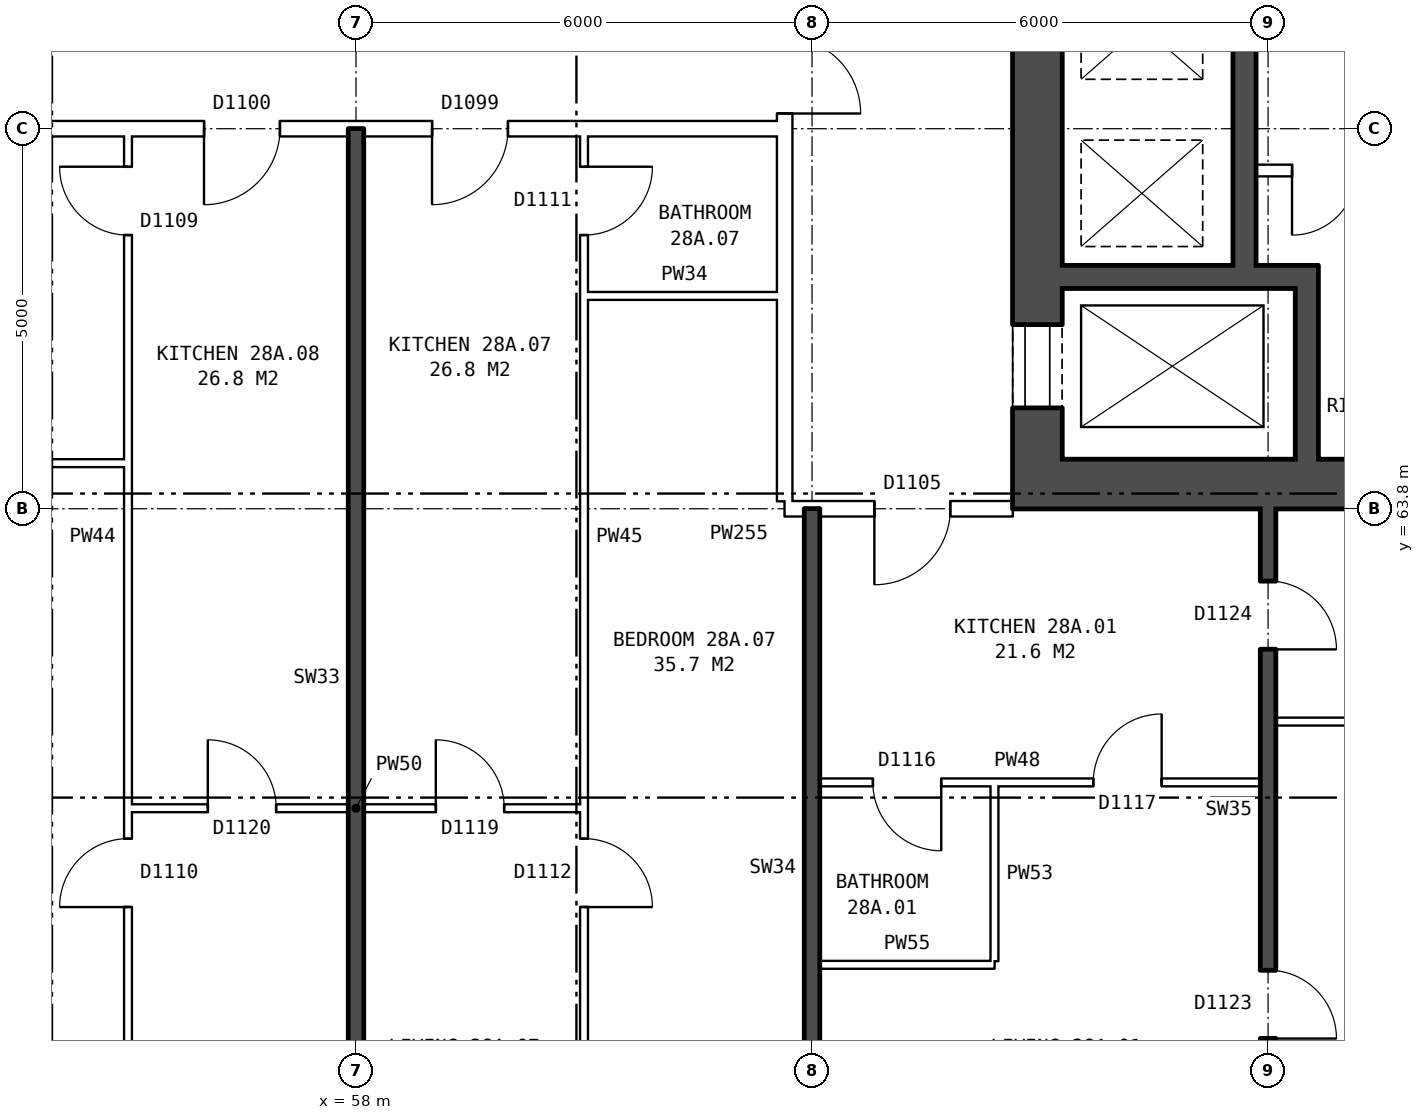
"""IFC4 building model, lengths in metres.
Left out: names, types, materials, properties, quantities, classifications, styles, units other than length and angle.
Written with IfcOpenShell. Run it as: python <this file> out.ifc"""

import sys

from ifc_helpers import new_model, si_unit, direction, frame, frame_2d, origin, place, context, subcontext, project, spatial, rectangle, extrude, element, fill, save


model = new_model("IFC4")
c1 = context("Model", 3, precision=1e-05, world=origin(), true_north=direction((0.0, 1.0)))
c2 = subcontext(c1, "Body", "Model", "MODEL_VIEW")
j1 = project(units=[si_unit("LENGTHUNIT", "METRE"), si_unit("PLANEANGLEUNIT", "RADIAN")], contexts=[c1])
p1 = place(None, origin())
s1 = spatial("IfcSite", under=j1, at=p1, CompositionType="ELEMENT")
p2 = place(p1, origin())
s2 = spatial("IfcBuilding", under=s1, at=p2, CompositionType="ELEMENT")
p3 = place(p2, frame((0.0, 0.0, 102.6)))
s3 = spatial("IfcBuildingStorey", under=s2, at=p3, CompositionType="ELEMENT", Elevation=102.6)
p4 = place(p3, frame((66.965, 64.45, 0.0), z_axis=(0.0, 0.0, 1.0), x_axis=(0.0, 1.0, 0.0)))
e1 = element("IfcWall", 1, at=p4, inside=s3, PredefinedType="SHEAR", context=c2, shape_type="SweptSolid", body=[
    extrude(rectangle(XDim=11.1, YDim=0.65, at=frame_2d((5.55, 0.0))), origin(), (0.0, 0.0, 1.0), 2.85),
])
p5 = place(p4, frame((0.675, 0.0, 0.0)))
e2 = element("IfcOpeningElement", 2, at=p5, cuts=e1, PredefinedType="OPENING", context=c2, shape_type="SweptSolid", body=[
    extrude(rectangle(XDim=1.1, YDim=2.1, at=frame_2d((0.55, 1.05))), frame((0.0, 0.335, 0.0), z_axis=(0.0, -1.0, 0.0), x_axis=(1.0, 0.0, 0.0)), (0.0, 0.0, 1.0), 0.67),
])
p6 = place(p4, frame((9.25, 0.0, 0.0)))
e3 = element("IfcOpeningElement", 3, at=p6, cuts=e1, PredefinedType="OPENING", context=c2, shape_type="SweptSolid", body=[
    extrude(rectangle(XDim=1.1, YDim=2.1, at=frame_2d((0.55, 1.05))), frame((0.0, 0.335, 0.0), z_axis=(0.0, -1.0, 0.0), x_axis=(1.0, 0.0, 0.0)), (0.0, 0.0, 1.0), 0.67),
])
p7 = place(p3, frame((66.64, 64.125, 0.0), z_axis=(0.0, 0.0, 1.0), x_axis=(1.0, 0.0, 0.0)))
e4 = element("IfcWall", 4, at=p7, inside=s3, PredefinedType="SHEAR", context=c2, shape_type="SweptSolid", body=[
    extrude(rectangle(XDim=9.0, YDim=0.65, at=frame_2d((4.5, 0.0))), origin(), (0.0, 0.0, 1.0), 2.85),
])
p8 = place(p3, frame((67.29, 66.85, 0.0), z_axis=(0.0, 0.0, 1.0), x_axis=(1.0, 0.0, 0.0)))
e5 = element("IfcWall", 5, at=p8, inside=s3, PredefinedType="SHEAR", context=c2, shape_type="SweptSolid", body=[
    extrude(rectangle(XDim=3.37, YDim=0.3, at=frame_2d((1.685, 0.0))), origin(), (0.0, 0.0, 1.0), 2.85),
])
p9 = place(p3, frame((69.84, 68.25, 0.0), z_axis=(0.0, 0.0, 1.0), x_axis=(1.0, 0.0, 0.0)))
e6 = element("IfcWall", 6, at=p9, inside=s3, PredefinedType="PARTITIONING", context=c2, shape_type="SweptSolid", body=[
    extrude(rectangle(XDim=1.8, YDim=0.15, at=frame_2d((0.9, 0.0))), origin(), (0.0, 0.0, 1.0), 2.85),
])
p10 = place(p9, frame((0.475, 0.0, 0.0)))
e7 = element("IfcOpeningElement", 7, at=p10, cuts=e6, PredefinedType="OPENING", context=c2, shape_type="SweptSolid", body=[
    extrude(rectangle(XDim=0.85, YDim=2.1, at=frame_2d((0.425, 1.05))), frame((0.0, 0.085, 0.0), z_axis=(0.0, -1.0, 0.0), x_axis=(1.0, 0.0, 0.0)), (0.0, 0.0, 1.0), 0.17),
])
p11 = place(p3, frame((69.69, 67.0, 0.0), z_axis=(0.0, 0.0, 1.0), x_axis=(0.0, 1.0, 0.0)))
e8 = element("IfcWall", 8, at=p11, inside=s3, PredefinedType="SHEAR", context=c2, shape_type="SweptSolid", body=[
    extrude(rectangle(XDim=6.6, YDim=0.3, at=frame_2d((3.3, 0.0))), origin(), (0.0, 0.0, 1.0), 2.85),
])
p12 = place(p3, frame((70.51, 64.45, 0.0), z_axis=(0.0, 0.0, 1.0), x_axis=(0.0, 1.0, 0.0)))
e9 = element("IfcWall", 9, at=p12, inside=s3, PredefinedType="SHEAR", context=c2, shape_type="SweptSolid", body=[
    extrude(rectangle(XDim=2.25, YDim=0.3, at=frame_2d((1.125, 0.0))), origin(), (0.0, 0.0, 1.0), 2.85),
])
p13 = place(p3, frame((63.64, 63.9, 0.0), z_axis=(0.0, 0.0, 1.0), x_axis=(0.0, 1.0, 0.0)))
e10 = element("IfcWall", 10, at=p13, inside=s3, PredefinedType="PARTITIONING", context=c2, shape_type="SweptSolid", body=[
    extrude(rectangle(XDim=12.2, YDim=0.2, at=frame_2d((6.1, 0.0))), origin(), (0.0, 0.0, 1.0), 2.85),
])
p14 = place(p13, frame((5.1, 0.0, 0.0)))
e11 = element("IfcOpeningElement", 11, at=p14, cuts=e10, PredefinedType="OPENING", context=c2, shape_type="SweptSolid", body=[
    extrude(rectangle(XDim=2.0, YDim=2.1, at=frame_2d((1.0, 1.05))), frame((0.0, 0.11, 0.0), z_axis=(0.0, -1.0, 0.0), x_axis=(1.0, 0.0, 0.0)), (0.0, 0.0, 1.0), 0.22),
])
p15 = place(p3, frame((64.1, 57.8, 0.0), z_axis=(0.0, 0.0, 1.0), x_axis=(1.0, 0.0, 0.0)))
e12 = element("IfcWall", 12, at=p15, inside=s3, PredefinedType="PARTITIONING", context=c2, shape_type="SweptSolid", body=[
    extrude(rectangle(XDim=2.3, YDim=0.1, at=frame_2d((1.15, 0.0))), origin(), (0.0, 0.0, 1.0), 2.85),
])
p16 = place(p3, frame((55.0, 59.86, 0.0), z_axis=(0.0, 0.0, 1.0), x_axis=(1.0, 0.0, 0.0)))
e13 = element("IfcWall", 13, at=p16, inside=s3, PredefinedType="PARTITIONING", context=c2, shape_type="SweptSolid", body=[
    extrude(rectangle(XDim=6.0, YDim=0.1, at=frame_2d((3.0, 0.0))), origin(), (0.0, 0.0, 1.0), 2.85),
])
p17 = place(p16, frame((4.05, 0.0, 0.0)))
e14 = element("IfcOpeningElement", 14, at=p17, cuts=e13, PredefinedType="OPENING", context=c2, shape_type="SweptSolid", body=[
    extrude(rectangle(XDim=0.9, YDim=2.1, at=frame_2d((0.45, 1.05))), frame((0.0, 0.06, 0.0), z_axis=(0.0, -1.0, 0.0), x_axis=(1.0, 0.0, 0.0)), (0.0, 0.0, 1.0), 0.12),
])
p18 = place(p16, frame((1.05, 0.0, 0.0)))
e15 = element("IfcOpeningElement", 15, at=p18, cuts=e13, PredefinedType="OPENING", context=c2, shape_type="SweptSolid", body=[
    extrude(rectangle(XDim=0.9, YDim=2.1, at=frame_2d((0.45, 1.05))), frame((0.0, 0.06, 0.0), z_axis=(0.0, -1.0, 0.0), x_axis=(1.0, 0.0, 0.0)), (0.0, 0.0, 1.0), 0.12),
])
p19 = place(p3, frame((64.1, 60.2, 0.0), z_axis=(0.0, 0.0, 1.0), x_axis=(1.0, 0.0, 0.0)))
e16 = element("IfcWall", 16, at=p19, inside=s3, PredefinedType="PARTITIONING", context=c2, shape_type="SweptSolid", body=[
    extrude(rectangle(XDim=5.8, YDim=0.1, at=frame_2d((2.9, 0.0))), origin(), (0.0, 0.0, 1.0), 2.85),
])
p20 = place(p19, frame((3.6, 0.0, 0.0)))
e17 = element("IfcOpeningElement", 17, at=p20, cuts=e16, PredefinedType="OPENING", context=c2, shape_type="SweptSolid", body=[
    extrude(rectangle(XDim=0.9, YDim=2.1, at=frame_2d((0.45, 1.05))), frame((0.0, 0.06, 0.0), z_axis=(0.0, -1.0, 0.0), x_axis=(1.0, 0.0, 0.0)), (0.0, 0.0, 1.0), 0.12),
])
p21 = place(p19, frame((0.7, 0.0, 0.0)))
e18 = element("IfcOpeningElement", 18, at=p21, cuts=e16, PredefinedType="OPENING", context=c2, shape_type="SweptSolid", body=[
    extrude(rectangle(XDim=0.9, YDim=2.1, at=frame_2d((0.45, 1.05))), frame((0.0, 0.06, 0.0), z_axis=(0.0, -1.0, 0.0), x_axis=(1.0, 0.0, 0.0)), (0.0, 0.0, 1.0), 0.12),
])
p22 = place(p3, frame((70.1, 61.0, 0.0), z_axis=(0.0, 0.0, 1.0), x_axis=(1.0, 0.0, 0.0)))
e19 = element("IfcWall", 19, at=p22, inside=s3, PredefinedType="PARTITIONING", context=c2, shape_type="SweptSolid", body=[
    extrude(rectangle(XDim=5.54, YDim=0.1, at=frame_2d((2.77, 0.0))), origin(), (0.0, 0.0, 1.0), 2.85),
])
p23 = place(p3, frame((63.64, 63.8, 0.0), z_axis=(0.0, 0.0, 1.0), x_axis=(1.0, 0.0, 0.0)))
e20 = element("IfcWall", 20, at=p23, inside=s3, PredefinedType="PARTITIONING", context=c2, shape_type="SweptSolid", body=[
    extrude(rectangle(XDim=3.0, YDim=0.2, at=frame_2d((1.5, 0.0))), origin(), (0.0, 0.0, 1.0), 2.85),
])
p24 = place(p23, frame((1.18, 0.0, 0.0)))
e21 = element("IfcOpeningElement", 21, at=p24, cuts=e20, PredefinedType="OPENING", context=c2, shape_type="SweptSolid", body=[
    extrude(rectangle(XDim=1.0, YDim=2.1, at=frame_2d((0.5, 1.05))), frame((0.0, 0.11, 0.0), z_axis=(0.0, -1.0, 0.0), x_axis=(1.0, 0.0, 0.0)), (0.0, 0.0, 1.0), 0.22),
])
p25 = place(p3, frame((52.1, 64.4, 0.0), z_axis=(0.0, 0.0, 1.0), x_axis=(1.0, 0.0, 0.0)))
e22 = element("IfcWall", 22, at=p25, inside=s3, PredefinedType="PARTITIONING", context=c2, shape_type="SweptSolid", body=[
    extrude(rectangle(XDim=2.9, YDim=0.1, at=frame_2d((1.45, 0.0))), origin(), (0.0, 0.0, 1.0), 2.85),
])
p26 = place(p3, frame((61.0, 66.6, 0.0), z_axis=(0.0, 0.0, 1.0), x_axis=(1.0, 0.0, 0.0)))
e23 = element("IfcWall", 23, at=p26, inside=s3, PredefinedType="PARTITIONING", context=c2, shape_type="SweptSolid", body=[
    extrude(rectangle(XDim=2.64, YDim=0.1, at=frame_2d((1.32, 0.0))), origin(), (0.0, 0.0, 1.0), 2.85),
])
p27 = place(p3, frame((44.36, 68.8, 0.0), z_axis=(0.0, 0.0, 1.0), x_axis=(1.0, 0.0, 0.0)))
e24 = element("IfcWall", 24, at=p27, inside=s3, PredefinedType="PARTITIONING", context=c2, shape_type="SweptSolid", body=[
    extrude(rectangle(XDim=19.28, YDim=0.2, at=frame_2d((9.64, 0.0))), origin(), (0.0, 0.0, 1.0), 2.85),
])
p28 = place(p27, frame((14.64, 0.0, 0.0)))
e25 = element("IfcOpeningElement", 25, at=p28, cuts=e24, PredefinedType="OPENING", context=c2, shape_type="SweptSolid", body=[
    extrude(rectangle(XDim=1.0, YDim=2.1, at=frame_2d((0.5, 1.05))), frame((0.0, 0.11, 0.0), z_axis=(0.0, -1.0, 0.0), x_axis=(1.0, 0.0, 0.0)), (0.0, 0.0, 1.0), 0.22),
])
p29 = place(p27, frame((11.64, 0.0, 0.0)))
e26 = element("IfcOpeningElement", 26, at=p29, cuts=e24, PredefinedType="OPENING", context=c2, shape_type="SweptSolid", body=[
    extrude(rectangle(XDim=1.0, YDim=2.1, at=frame_2d((0.5, 1.05))), frame((0.0, 0.11, 0.0), z_axis=(0.0, -1.0, 0.0), x_axis=(1.0, 0.0, 0.0)), (0.0, 0.0, 1.0), 0.22),
])
p30 = place(p27, frame((5.64, 0.0, 0.0)))
e27 = element("IfcOpeningElement", 27, at=p30, cuts=e24, PredefinedType="OPENING", context=c2, shape_type="SweptSolid", body=[
    extrude(rectangle(XDim=1.0, YDim=2.1, at=frame_2d((0.5, 1.05))), frame((0.0, 0.11, 0.0), z_axis=(0.0, -1.0, 0.0), x_axis=(1.0, 0.0, 0.0)), (0.0, 0.0, 1.0), 0.22),
])
p31 = place(p3, frame((55.0, 54.36, 0.0), z_axis=(0.0, 0.0, 1.0), x_axis=(0.0, 1.0, 0.0)))
e28 = element("IfcWall", 28, at=p31, inside=s3, PredefinedType="PARTITIONING", context=c2, shape_type="SweptSolid", body=[
    extrude(rectangle(XDim=14.34, YDim=0.1, at=frame_2d((7.17, 0.0))), origin(), (0.0, 0.0, 1.0), 2.85),
])
p32 = place(p31, frame((4.2, 0.0, 0.0)))
e29 = element("IfcOpeningElement", 29, at=p32, cuts=e28, PredefinedType="OPENING", context=c2, shape_type="SweptSolid", body=[
    extrude(rectangle(XDim=0.9, YDim=2.1, at=frame_2d((0.45, 1.05))), frame((0.0, 0.06, 0.0), z_axis=(0.0, -1.0, 0.0), x_axis=(1.0, 0.0, 0.0)), (0.0, 0.0, 1.0), 0.12),
])
p33 = place(p31, frame((13.04, 0.0, 0.0)))
e30 = element("IfcOpeningElement", 30, at=p33, cuts=e28, PredefinedType="OPENING", context=c2, shape_type="SweptSolid", body=[
    extrude(rectangle(XDim=0.9, YDim=2.1, at=frame_2d((0.45, 1.05))), frame((0.0, 0.06, 0.0), z_axis=(0.0, -1.0, 0.0), x_axis=(1.0, 0.0, 0.0)), (0.0, 0.0, 1.0), 0.12),
])
p34 = place(p3, frame((58.0, 54.36, 0.0), z_axis=(0.0, 0.0, 1.0), x_axis=(0.0, 1.0, 0.0)))
e31 = element("IfcWall", 31, at=p34, inside=s3, PredefinedType="SOLIDWALL", context=c2, shape_type="SweptSolid", body=[
    extrude(rectangle(XDim=14.44, YDim=0.2, at=frame_2d((7.22, 0.0))), origin(), (0.0, 0.0, 1.0), 2.85),
])
p35 = place(p3, frame((61.0, 54.36, 0.0), z_axis=(0.0, 0.0, 1.0), x_axis=(0.0, 1.0, 0.0)))
e32 = element("IfcWall", 32, at=p35, inside=s3, PredefinedType="PARTITIONING", context=c2, shape_type="SweptSolid", body=[
    extrude(rectangle(XDim=14.34, YDim=0.1, at=frame_2d((7.17, 0.0))), origin(), (0.0, 0.0, 1.0), 2.85),
])
p36 = place(p35, frame((4.2, 0.0, 0.0)))
e33 = element("IfcOpeningElement", 33, at=p36, cuts=e32, PredefinedType="OPENING", context=c2, shape_type="SweptSolid", body=[
    extrude(rectangle(XDim=0.9, YDim=2.1, at=frame_2d((0.45, 1.05))), frame((0.0, 0.06, 0.0), z_axis=(0.0, -1.0, 0.0), x_axis=(1.0, 0.0, 0.0)), (0.0, 0.0, 1.0), 0.12),
])
p37 = place(p35, frame((13.04, 0.0, 0.0)))
e34 = element("IfcOpeningElement", 34, at=p37, cuts=e32, PredefinedType="OPENING", context=c2, shape_type="SweptSolid", body=[
    extrude(rectangle(XDim=0.9, YDim=2.1, at=frame_2d((0.45, 1.05))), frame((0.0, 0.06, 0.0), z_axis=(0.0, -1.0, 0.0), x_axis=(1.0, 0.0, 0.0)), (0.0, 0.0, 1.0), 0.12),
])
p38 = place(p3, frame((64.0, 54.36, 0.0), z_axis=(0.0, 0.0, 1.0), x_axis=(0.0, 1.0, 0.0)))
e35 = element("IfcWall", 35, at=p38, inside=s3, PredefinedType="SOLIDWALL", context=c2, shape_type="SweptSolid", body=[
    extrude(rectangle(XDim=9.44, YDim=0.2, at=frame_2d((4.72, 0.0))), origin(), (0.0, 0.0, 1.0), 2.85),
])
p39 = place(p3, frame((66.4, 57.85, 0.0), z_axis=(0.0, 0.0, 1.0), x_axis=(0.0, 1.0, 0.0)))
e36 = element("IfcWall", 36, at=p39, inside=s3, PredefinedType="PARTITIONING", context=c2, shape_type="SweptSolid", body=[
    extrude(rectangle(XDim=2.3, YDim=0.1, at=frame_2d((1.15, 0.0))), origin(), (0.0, 0.0, 1.0), 2.85),
])
p40 = place(p3, frame((70.0, 54.36, 0.0), z_axis=(0.0, 0.0, 1.0), x_axis=(0.0, 1.0, 0.0)))
e37 = element("IfcWall", 37, at=p40, inside=s3, PredefinedType="SOLIDWALL", context=c2, shape_type="SweptSolid", body=[
    extrude(rectangle(XDim=9.44, YDim=0.2, at=frame_2d((4.72, 0.0))), origin(), (0.0, 0.0, 1.0), 2.85),
])
p41 = place(p40, frame((2.47, 0.0, 0.0)))
e38 = element("IfcOpeningElement", 38, at=p41, cuts=e37, PredefinedType="OPENING", context=c2, shape_type="SweptSolid", body=[
    extrude(rectangle(XDim=0.9, YDim=2.1, at=frame_2d((0.45, 1.05))), frame((0.0, 0.11, 0.0), z_axis=(0.0, -1.0, 0.0), x_axis=(1.0, 0.0, 0.0)), (0.0, 0.0, 1.0), 0.22),
])
p42 = place(p40, frame((7.59, 0.0, 0.0)))
e39 = element("IfcOpeningElement", 39, at=p42, cuts=e37, PredefinedType="OPENING", context=c2, shape_type="SweptSolid", body=[
    extrude(rectangle(XDim=0.9, YDim=2.1, at=frame_2d((0.45, 1.05))), frame((0.0, 0.11, 0.0), z_axis=(0.0, -1.0, 0.0), x_axis=(1.0, 0.0, 0.0)), (0.0, 0.0, 1.0), 0.22),
])
p43 = place(p5, origin())
e40 = element("IfcDoor", 40, at=p43, inside=s3, OperationType="DOUBLE_DOOR_SLIDING", PredefinedType="DOOR", context=c2, shape_type="SweptSolid", body=[
    extrude(rectangle(XDim=1.1, YDim=2.1, at=frame_2d((0.55, 1.05))), frame((0.0, -0.26, 0.0), z_axis=(0.0, -1.0, 0.0), x_axis=(1.0, 0.0, 0.0)), (0.0, 0.0, 1.0), 0.05),
])
fill(e2, e40)
p44 = place(p10, frame((0.85, 0.0, 0.0), z_axis=(0.0, 0.0, 1.0), x_axis=(-1.0, 0.0, 0.0)))
e41 = element("IfcDoor", 41, at=p44, inside=s3, OperationType="SINGLE_SWING_RIGHT", PredefinedType="DOOR", context=c2, shape_type="SweptSolid", body=[
    extrude(rectangle(XDim=0.85, YDim=2.1, at=frame_2d((0.425, 1.05))), frame((0.0, 0.025, 0.0), z_axis=(0.0, -1.0, 0.0), x_axis=(1.0, 0.0, 0.0)), (0.0, 0.0, 1.0), 0.05),
])
fill(e7, e41)
p45 = place(p14, frame((2.0, 0.0, 0.0), z_axis=(0.0, 0.0, 1.0), x_axis=(-1.0, 0.0, 0.0)))
e42 = element("IfcDoor", 42, at=p45, inside=s3, OperationType="DOUBLE_DOOR_SINGLE_SWING", PredefinedType="DOOR", context=c2, shape_type="SweptSolid", body=[
    extrude(rectangle(XDim=2.0, YDim=2.1, at=frame_2d((1.0, 1.05))), frame((0.0, 0.025, 0.0), z_axis=(0.0, -1.0, 0.0), x_axis=(1.0, 0.0, 0.0)), (0.0, 0.0, 1.0), 0.05),
])
fill(e11, e42)
p46 = place(p41, frame((0.9, 0.0, 0.0), z_axis=(0.0, 0.0, 1.0), x_axis=(-1.0, 0.0, 0.0)))
e43 = element("IfcDoor", 43, at=p46, inside=s3, OperationType="SINGLE_SWING_RIGHT", PredefinedType="DOOR", context=c2, shape_type="SweptSolid", body=[
    extrude(rectangle(XDim=0.9, YDim=2.1, at=frame_2d((0.45, 1.05))), frame((0.0, 0.025, 0.0), z_axis=(0.0, -1.0, 0.0), x_axis=(1.0, 0.0, 0.0)), (0.0, 0.0, 1.0), 0.05),
])
fill(e38, e43)
p47 = place(p42, frame((0.9, 0.0, 0.0), z_axis=(0.0, 0.0, 1.0), x_axis=(-1.0, 0.0, 0.0)))
e44 = element("IfcDoor", 44, at=p47, inside=s3, OperationType="SINGLE_SWING_RIGHT", PredefinedType="DOOR", context=c2, shape_type="SweptSolid", body=[
    extrude(rectangle(XDim=0.9, YDim=2.1, at=frame_2d((0.45, 1.05))), frame((0.0, 0.025, 0.0), z_axis=(0.0, -1.0, 0.0), x_axis=(1.0, 0.0, 0.0)), (0.0, 0.0, 1.0), 0.05),
])
fill(e39, e44)
p48 = place(p24, frame((1.0, 0.0, 0.0), z_axis=(0.0, 0.0, 1.0), x_axis=(-1.0, 0.0, 0.0)))
e45 = element("IfcDoor", 45, at=p48, inside=s3, OperationType="SINGLE_SWING_RIGHT", PredefinedType="DOOR", context=c2, shape_type="SweptSolid", body=[
    extrude(rectangle(XDim=1.0, YDim=2.1, at=frame_2d((0.5, 1.05))), frame((0.0, 0.025, 0.0), z_axis=(0.0, -1.0, 0.0), x_axis=(1.0, 0.0, 0.0)), (0.0, 0.0, 1.0), 0.05),
])
fill(e21, e45)
p49 = place(p20, origin())
e46 = element("IfcDoor", 46, at=p49, inside=s3, OperationType="SINGLE_SWING_RIGHT", PredefinedType="DOOR", context=c2, shape_type="SweptSolid", body=[
    extrude(rectangle(XDim=0.9, YDim=2.1, at=frame_2d((0.45, 1.05))), frame((0.0, 0.025, 0.0), z_axis=(0.0, -1.0, 0.0), x_axis=(1.0, 0.0, 0.0)), (0.0, 0.0, 1.0), 0.05),
])
fill(e17, e46)
p50 = place(p21, frame((0.9, 0.0, 0.0), z_axis=(0.0, 0.0, 1.0), x_axis=(-1.0, 0.0, 0.0)))
e47 = element("IfcDoor", 47, at=p50, inside=s3, OperationType="SINGLE_SWING_LEFT", PredefinedType="DOOR", context=c2, shape_type="SweptSolid", body=[
    extrude(rectangle(XDim=0.9, YDim=2.1, at=frame_2d((0.45, 1.05))), frame((0.0, 0.025, 0.0), z_axis=(0.0, -1.0, 0.0), x_axis=(1.0, 0.0, 0.0)), (0.0, 0.0, 1.0), 0.05),
])
fill(e18, e47)
p51 = place(p36, frame((0.9, 0.0, 0.0), z_axis=(0.0, 0.0, 1.0), x_axis=(-1.0, 0.0, 0.0)))
e48 = element("IfcDoor", 48, at=p51, inside=s3, OperationType="SINGLE_SWING_RIGHT", PredefinedType="DOOR", context=c2, shape_type="SweptSolid", body=[
    extrude(rectangle(XDim=0.9, YDim=2.1, at=frame_2d((0.45, 1.05))), frame((0.0, 0.025, 0.0), z_axis=(0.0, -1.0, 0.0), x_axis=(1.0, 0.0, 0.0)), (0.0, 0.0, 1.0), 0.05),
])
fill(e33, e48)
p52 = place(p28, frame((1.0, 0.0, 0.0), z_axis=(0.0, 0.0, 1.0), x_axis=(-1.0, 0.0, 0.0)))
e49 = element("IfcDoor", 49, at=p52, inside=s3, OperationType="SINGLE_SWING_RIGHT", PredefinedType="DOOR", context=c2, shape_type="SweptSolid", body=[
    extrude(rectangle(XDim=1.0, YDim=2.1, at=frame_2d((0.5, 1.05))), frame((0.0, 0.025, 0.0), z_axis=(0.0, -1.0, 0.0), x_axis=(1.0, 0.0, 0.0)), (0.0, 0.0, 1.0), 0.05),
])
fill(e25, e49)
p53 = place(p17, origin())
e50 = element("IfcDoor", 50, at=p53, inside=s3, OperationType="SINGLE_SWING_LEFT", PredefinedType="DOOR", context=c2, shape_type="SweptSolid", body=[
    extrude(rectangle(XDim=0.9, YDim=2.1, at=frame_2d((0.45, 1.05))), frame((0.0, 0.025, 0.0), z_axis=(0.0, -1.0, 0.0), x_axis=(1.0, 0.0, 0.0)), (0.0, 0.0, 1.0), 0.05),
])
fill(e14, e50)
p54 = place(p37, frame((0.9, 0.0, 0.0), z_axis=(0.0, 0.0, 1.0), x_axis=(-1.0, 0.0, 0.0)))
e51 = element("IfcDoor", 51, at=p54, inside=s3, OperationType="SINGLE_SWING_LEFT", PredefinedType="DOOR", context=c2, shape_type="SweptSolid", body=[
    extrude(rectangle(XDim=0.9, YDim=2.1, at=frame_2d((0.45, 1.05))), frame((0.0, 0.025, 0.0), z_axis=(0.0, -1.0, 0.0), x_axis=(1.0, 0.0, 0.0)), (0.0, 0.0, 1.0), 0.05),
])
fill(e34, e51)
p55 = place(p32, origin())
e52 = element("IfcDoor", 52, at=p55, inside=s3, OperationType="SINGLE_SWING_LEFT", PredefinedType="DOOR", context=c2, shape_type="SweptSolid", body=[
    extrude(rectangle(XDim=0.9, YDim=2.1, at=frame_2d((0.45, 1.05))), frame((0.0, 0.025, 0.0), z_axis=(0.0, -1.0, 0.0), x_axis=(1.0, 0.0, 0.0)), (0.0, 0.0, 1.0), 0.05),
])
fill(e29, e52)
p56 = place(p29, frame((1.0, 0.0, 0.0), z_axis=(0.0, 0.0, 1.0), x_axis=(-1.0, 0.0, 0.0)))
e53 = element("IfcDoor", 53, at=p56, inside=s3, OperationType="SINGLE_SWING_RIGHT", PredefinedType="DOOR", context=c2, shape_type="SweptSolid", body=[
    extrude(rectangle(XDim=1.0, YDim=2.1, at=frame_2d((0.5, 1.05))), frame((0.0, 0.025, 0.0), z_axis=(0.0, -1.0, 0.0), x_axis=(1.0, 0.0, 0.0)), (0.0, 0.0, 1.0), 0.05),
])
fill(e26, e53)
p57 = place(p18, origin())
e54 = element("IfcDoor", 54, at=p57, inside=s3, OperationType="SINGLE_SWING_LEFT", PredefinedType="DOOR", context=c2, shape_type="SweptSolid", body=[
    extrude(rectangle(XDim=0.9, YDim=2.1, at=frame_2d((0.45, 1.05))), frame((0.0, 0.025, 0.0), z_axis=(0.0, -1.0, 0.0), x_axis=(1.0, 0.0, 0.0)), (0.0, 0.0, 1.0), 0.05),
])
fill(e15, e54)
p58 = place(p33, origin())
e55 = element("IfcDoor", 55, at=p58, inside=s3, OperationType="SINGLE_SWING_RIGHT", PredefinedType="DOOR", context=c2, shape_type="SweptSolid", body=[
    extrude(rectangle(XDim=0.9, YDim=2.1, at=frame_2d((0.45, 1.05))), frame((0.0, 0.025, 0.0), z_axis=(0.0, -1.0, 0.0), x_axis=(1.0, 0.0, 0.0)), (0.0, 0.0, 1.0), 0.05),
])
fill(e30, e55)
save(model, sys.argv[1])
